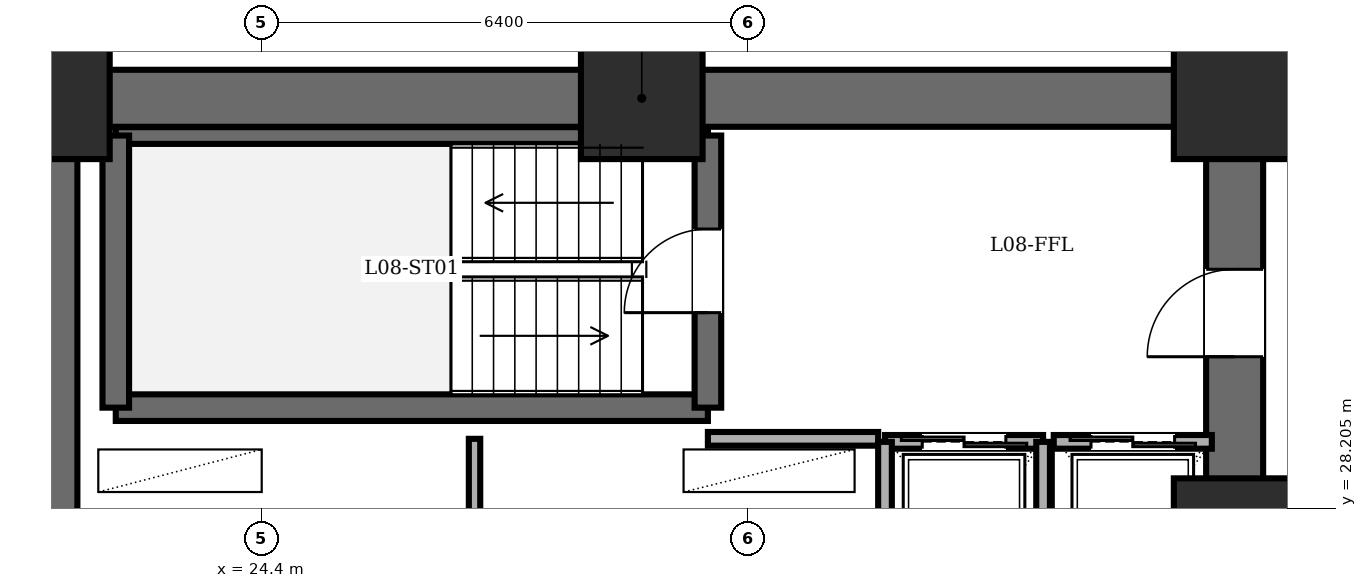
"""IFC4 building model, lengths in metres.
Left out: names, types, materials, properties, quantities, classifications, styles, units other than length and angle.
Written with IfcOpenShell. Run it as: python <this file> out.ifc"""

import sys

from ifc_helpers import new_model, si_unit, direction, frame, frame_2d, origin, origin_2d, place, context, subcontext, project, spatial, rectangle, extrude, element, fill, save


model = new_model("IFC4")
c1 = context("Model", 3, precision=1e-05, world=origin(), true_north=direction((0.0, 1.0)))
c2 = subcontext(c1, "Body", "Model", "MODEL_VIEW")
j1 = project(units=[si_unit("LENGTHUNIT", "METRE"), si_unit("PLANEANGLEUNIT", "RADIAN")], contexts=[c1])
p1 = place(None, origin())
s1 = spatial("IfcSite", under=j1, at=p1, CompositionType="ELEMENT")
p2 = place(p1, origin())
s2 = spatial("IfcBuilding", under=s1, at=p2, CompositionType="ELEMENT")
p3 = place(p2, frame((0.0, 0.0, 32.4)))
s3 = spatial("IfcBuildingStorey", under=s2, at=p3, CompositionType="ELEMENT", Elevation=32.4)
for number, where, z_axis, x_axis in (
    (1, (37.2, 27.8, 0.0), (0.0, 0.0, 1.0), (1.0, 0.0, 0.0)),
    (2, (37.2, 33.6, 0.0), (0.0, 0.0, 1.0), (1.0, 0.0, 0.0)),
    (3, (29.4, 33.6, 0.0), (0.0, 0.0, 1.0), (1.0, 0.0, 0.0)),
    (4, (21.6, 33.6, 0.0), (0.0, 0.0, 1.0), (1.0, 0.0, 0.0)),
):
    element("IfcColumn", number, at=place(p3, frame(where, z_axis=z_axis, x_axis=x_axis)), inside=s3, PredefinedType="COLUMN", context=c2, shape_type="SweptSolid", body=[
        extrude(rectangle(XDim=1.6, YDim=1.6, at=origin_2d()), origin(), (0.0, 0.0, 1.0), 3.6),
    ])
p4 = place(p3, frame((21.6, 14.4, 0.0), z_axis=(0.0, 0.0, 1.0), x_axis=(0.0, 1.0, 0.0)))
e5 = element("IfcWall", 5, at=p4, inside=s3, PredefinedType="SHEAR", context=c2, shape_type="SweptSolid", body=[
    extrude(rectangle(XDim=19.2, YDim=0.75, at=frame_2d((9.6, 0.0))), origin(), (0.0, 0.0, 1.0), 3.4),
])
p5 = place(p3, frame((21.6, 33.6, 0.0), z_axis=(0.0, 0.0, 1.0), x_axis=(1.0, 0.0, 0.0)))
e6 = element("IfcWall", 6, at=p5, inside=s3, PredefinedType="SHEAR", context=c2, shape_type="SweptSolid", body=[
    extrude(rectangle(XDim=15.6, YDim=0.75, at=frame_2d((7.8, 0.0))), origin(), (0.0, 0.0, 1.0), 3.4),
])
p6 = place(p3, frame((37.2, 14.4, 0.0), z_axis=(0.0, 0.0, 1.0), x_axis=(0.0, 1.0, 0.0)))
e7 = element("IfcWall", 7, at=p6, inside=s3, PredefinedType="SHEAR", context=c2, shape_type="SweptSolid", body=[
    extrude(rectangle(XDim=19.2, YDim=0.75, at=frame_2d((9.6, 0.0))), origin(), (0.0, 0.0, 1.0), 3.4),
])
p7 = place(p6, frame((15.8, 0.0, 0.0)))
e8 = element("IfcOpeningElement", 8, at=p7, cuts=e7, PredefinedType="OPENING", context=c2, shape_type="SweptSolid", body=[
    extrude(rectangle(XDim=1.15, YDim=2.15, at=frame_2d((0.575, 1.075))), frame((0.0, 0.385, 0.0), z_axis=(0.0, -1.0, 0.0), x_axis=(1.0, 0.0, 0.0)), (0.0, 0.0, 1.0), 0.77),
])
p8 = place(p6, frame((3.6, 0.0, 0.0)))
e9 = element("IfcOpeningElement", 9, at=p8, cuts=e7, PredefinedType="OPENING", context=c2, shape_type="SweptSolid", body=[
    extrude(rectangle(XDim=1.1, YDim=2.15, at=frame_2d((0.55, 1.075))), frame((0.0, 0.385, 0.0), z_axis=(0.0, -1.0, 0.0), x_axis=(1.0, 0.0, 0.0)), (0.0, 0.0, 1.0), 0.77),
])
p9 = place(p6, frame((8.6, 0.0, 0.0)))
e10 = element("IfcOpeningElement", 10, at=p9, cuts=e7, PredefinedType="OPENING", context=c2, shape_type="SweptSolid", body=[
    extrude(rectangle(XDim=1.3, YDim=2.2, at=frame_2d((0.65, 1.1))), frame((0.0, 0.385, 0.0), z_axis=(0.0, -1.0, 0.0), x_axis=(1.0, 0.0, 0.0)), (0.0, 0.0, 1.0), 0.77),
])
p10 = place(p3, frame((22.48, 29.53, 0.0), z_axis=(0.0, 0.0, 1.0), x_axis=(1.0, 0.0, 0.0)))
e11 = element("IfcWall", 11, at=p10, inside=s3, PredefinedType="SOLIDWALL", context=c2, shape_type="SweptSolid", body=[
    extrude(rectangle(XDim=7.79, YDim=0.35, at=frame_2d((3.895, 0.0))), origin(), (0.0, 0.0, 1.0), 3.4),
])
p11 = place(p3, frame((22.48, 33.11, 0.0), z_axis=(0.0, 0.0, 1.0), x_axis=(1.0, 0.0, 0.0)))
e12 = element("IfcWall", 12, at=p11, inside=s3, PredefinedType="PARTITIONING", context=c2, shape_type="SweptSolid", body=[
    extrude(rectangle(XDim=7.79, YDim=0.22, at=frame_2d((3.895, 0.0))), origin(), (0.0, 0.0, 1.0), 3.4),
])
p12 = place(p3, frame((22.48, 29.53, 0.0), z_axis=(0.0, 0.0, 1.0), x_axis=(0.0, 1.0, 0.0)))
e13 = element("IfcWall", 13, at=p12, inside=s3, PredefinedType="SOLIDWALL", context=c2, shape_type="SweptSolid", body=[
    extrude(rectangle(XDim=3.58, YDim=0.35, at=frame_2d((1.79, 0.0))), origin(), (0.0, 0.0, 1.0), 3.4),
])
p13 = place(p3, frame((30.27, 29.53, 0.0), z_axis=(0.0, 0.0, 1.0), x_axis=(0.0, 1.0, 0.0)))
e14 = element("IfcWall", 14, at=p13, inside=s3, PredefinedType="SOLIDWALL", context=c2, shape_type="SweptSolid", body=[
    extrude(rectangle(XDim=3.58, YDim=0.35, at=frame_2d((1.79, 0.0))), origin(), (0.0, 0.0, 1.0), 3.4),
])
p14 = place(p13, frame((1.25, 0.0, 0.0)))
e15 = element("IfcOpeningElement", 15, at=p14, cuts=e14, PredefinedType="OPENING", context=c2, shape_type="SweptSolid", body=[
    extrude(rectangle(XDim=1.1, YDim=2.15, at=frame_2d((0.55, 1.075))), frame((0.0, 0.185, 0.0), z_axis=(0.0, -1.0, 0.0), x_axis=(1.0, 0.0, 0.0)), (0.0, 0.0, 1.0), 0.37),
])
p15 = place(p3, frame((30.27, 29.12, 0.0), z_axis=(0.0, 0.0, 1.0), x_axis=(1.0, 0.0, 0.0)))
e16 = element("IfcWall", 16, at=p15, inside=s3, PredefinedType="PARTITIONING", context=c2, shape_type="SweptSolid", body=[
    extrude(rectangle(XDim=2.24, YDim=0.18, at=frame_2d((1.12, 0.0))), origin(), (0.0, 0.0, 1.0), 3.4),
])
p16 = place(p3, frame((27.2, 27.6, 0.0), z_axis=(0.0, 0.0, 1.0), x_axis=(0.0, 1.0, 0.0)))
e17 = element("IfcWall", 17, at=p16, inside=s3, PredefinedType="PARTITIONING", context=c2, shape_type="SweptSolid", body=[
    extrude(rectangle(XDim=1.52, YDim=0.15, at=frame_2d((0.76, 0.0))), origin(), (0.0, 0.0, 1.0), 3.4),
])
p17 = place(p3, frame((32.6, 29.08, 0.0), z_axis=(0.0, 0.0, 1.0), x_axis=(1.0, 0.0, 0.0)))
e18 = element("IfcWall", 18, at=p17, inside=s3, PredefinedType="PARTITIONING", context=c2, shape_type="SweptSolid", body=[
    extrude(rectangle(XDim=2.08, YDim=0.18, at=frame_2d((1.04, 0.0))), origin(), (0.0, 0.0, 1.0), 3.4),
])
p18 = place(p17, frame((0.49, 0.0, 0.0)))
e19 = element("IfcOpeningElement", 19, at=p18, cuts=e18, PredefinedType="OPENING", context=c2, shape_type="SweptSolid", body=[
    extrude(rectangle(XDim=1.1, YDim=2.2, at=frame_2d((0.55, 1.1))), frame((0.0, 0.1, 0.0), z_axis=(0.0, -1.0, 0.0), x_axis=(1.0, 0.0, 0.0)), (0.0, 0.0, 1.0), 0.2),
])
for number, where, z_axis, x_axis in (
    (20, (34.68, 26.35, 0.0), (0.0, 0.0, 1.0), (0.0, 1.0, 0.0)),
    (21, (32.6, 29.08, 0.0), (0.0, 0.0, 1.0), (0.0, -1.0, 0.0)),
):
    element("IfcWall", number, at=place(p3, frame(where, z_axis=z_axis, x_axis=x_axis)), inside=s3, PredefinedType="PARTITIONING", context=c2, shape_type="SweptSolid", body=[
        extrude(rectangle(XDim=2.73, YDim=0.18, at=frame_2d((1.365, 0.0))), origin(), (0.0, 0.0, 1.0), 3.4),
    ])
p19 = place(p3, frame((34.82, 29.08, 0.0), z_axis=(0.0, 0.0, 1.0), x_axis=(1.0, 0.0, 0.0)))
e22 = element("IfcWall", 22, at=p19, inside=s3, PredefinedType="PARTITIONING", context=c2, shape_type="SweptSolid", body=[
    extrude(rectangle(XDim=2.08, YDim=0.18, at=frame_2d((1.04, 0.0))), origin(), (0.0, 0.0, 1.0), 3.4),
])
p20 = place(p19, frame((0.49, 0.0, 0.0)))
e23 = element("IfcOpeningElement", 23, at=p20, cuts=e22, PredefinedType="OPENING", context=c2, shape_type="SweptSolid", body=[
    extrude(rectangle(XDim=1.1, YDim=2.2, at=frame_2d((0.55, 1.1))), frame((0.0, 0.1, 0.0), z_axis=(0.0, -1.0, 0.0), x_axis=(1.0, 0.0, 0.0)), (0.0, 0.0, 1.0), 0.2),
])
p21 = place(p14, origin())
e24 = element("IfcDoor", 24, at=p21, inside=s3, OperationType="SINGLE_SWING_LEFT", PredefinedType="DOOR", context=c2, shape_type="SweptSolid", body=[
    extrude(rectangle(XDim=1.1, YDim=2.15, at=frame_2d((0.55, 1.075))), frame((0.0, 0.025, 0.0), z_axis=(0.0, -1.0, 0.0), x_axis=(1.0, 0.0, 0.0)), (0.0, 0.0, 1.0), 0.05),
])
fill(e15, e24)
p22 = place(p7, origin())
e25 = element("IfcDoor", 25, at=p22, inside=s3, OperationType="SINGLE_SWING_LEFT", PredefinedType="DOOR", context=c2, shape_type="SweptSolid", body=[
    extrude(rectangle(XDim=1.15, YDim=2.15, at=frame_2d((0.575, 1.075))), frame((0.0, 0.025, 0.0), z_axis=(0.0, -1.0, 0.0), x_axis=(1.0, 0.0, 0.0)), (0.0, 0.0, 1.0), 0.05),
])
fill(e8, e25)
p23 = place(p18, origin())
e26 = element("IfcDoor", 26, at=p23, inside=s3, OperationType="DOUBLE_DOOR_SLIDING", PredefinedType="DOOR", context=c2, shape_type="SweptSolid", body=[
    extrude(rectangle(XDim=1.1, YDim=2.2, at=frame_2d((0.55, 1.1))), frame((0.0, 0.025, 0.0), z_axis=(0.0, -1.0, 0.0), x_axis=(1.0, 0.0, 0.0)), (0.0, 0.0, 1.0), 0.05),
])
fill(e19, e26)
p24 = place(p20, origin())
e27 = element("IfcDoor", 27, at=p24, inside=s3, OperationType="DOUBLE_DOOR_SLIDING", PredefinedType="DOOR", context=c2, shape_type="SweptSolid", body=[
    extrude(rectangle(XDim=1.1, YDim=2.2, at=frame_2d((0.55, 1.1))), frame((0.0, 0.025, 0.0), z_axis=(0.0, -1.0, 0.0), x_axis=(1.0, 0.0, 0.0)), (0.0, 0.0, 1.0), 0.05),
])
fill(e23, e27)
save(model, sys.argv[1])
